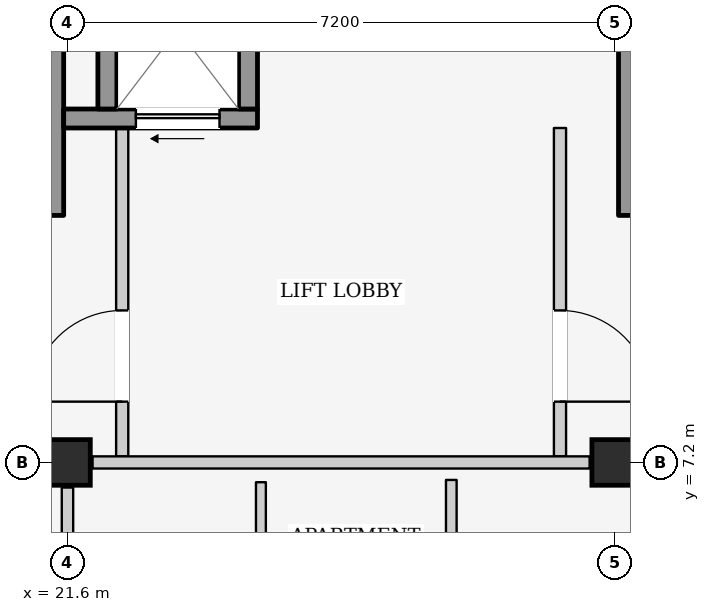
"""IFC4 building model, lengths in metres.
Left out: names, types, materials, properties, quantities, classifications, styles, units other than length and angle.
Written with IfcOpenShell. Run it as: python <this file> out.ifc"""

import sys

from ifc_helpers import new_model, si_unit, direction, frame, frame_2d, origin, origin_2d, place, context, subcontext, project, spatial, rectangle, extrude, element, fill, save


model = new_model("IFC4")
c1 = context("Model", 3, precision=1e-05, world=origin(), true_north=direction((0.0, 1.0)))
c2 = subcontext(c1, "Body", "Model", "MODEL_VIEW")
j1 = project(units=[si_unit("LENGTHUNIT", "METRE"), si_unit("PLANEANGLEUNIT", "RADIAN")], contexts=[c1])
p1 = place(None, origin())
s1 = spatial("IfcSite", under=j1, at=p1, CompositionType="ELEMENT")
p2 = place(p1, origin())
s2 = spatial("IfcBuilding", under=s1, at=p2, CompositionType="ELEMENT")
p3 = place(p2, frame((0.0, 0.0, 12.2)))
s3 = spatial("IfcBuildingStorey", under=s2, at=p3, CompositionType="ELEMENT", Elevation=12.2)
for number, where, z_axis, x_axis in (
    (1, (21.6, 7.2, 0.0), (0.0, 0.0, 1.0), (1.0, 0.0, 0.0)),
    (2, (28.8, 7.2, 0.0), (0.0, 0.0, 1.0), (1.0, 0.0, 0.0)),
):
    element("IfcColumn", number, at=place(p3, frame(where, z_axis=z_axis, x_axis=x_axis)), inside=s3, PredefinedType="COLUMN", context=c2, shape_type="SweptSolid", body=[
        extrude(rectangle(XDim=0.6, YDim=0.6, at=origin_2d()), origin(), (0.0, 0.0, 1.0), 3.2),
    ])
p4 = place(p3, frame((21.4, 10.45, 0.0), z_axis=(0.0, 0.0, 1.0), x_axis=(0.0, 1.0, 0.0)))
e3 = element("IfcWall", 3, at=p4, inside=s3, PredefinedType="SHEAR", context=c2, shape_type="SweptSolid", body=[
    extrude(rectangle(XDim=3.75, YDim=0.3, at=frame_2d((1.875, 0.0))), origin(), (0.0, 0.0, 1.0), 2.98),
])
p5 = place(p3, frame((22.32, 7.28, 0.0), z_axis=(0.0, 0.0, 1.0), x_axis=(0.0, 1.0, 0.0)))
e4 = element("IfcWall", 4, at=p5, inside=s3, PredefinedType="PARTITIONING", context=c2, shape_type="SweptSolid", body=[
    extrude(rectangle(XDim=4.32, YDim=0.16, at=frame_2d((2.16, 0.0))), origin(), (0.0, 0.0, 1.0), 2.98),
])
p6 = place(p5, frame((0.72, 0.0, 0.0)))
e5 = element("IfcOpeningElement", 5, at=p6, cuts=e4, PredefinedType="OPENING", context=c2, shape_type="SweptSolid", body=[
    extrude(rectangle(XDim=1.2, YDim=2.2, at=frame_2d((0.6, 1.1))), frame((0.0, 0.095, 0.0), z_axis=(0.0, -1.0, 0.0), x_axis=(1.0, 0.0, 0.0)), (0.0, 0.0, 1.0), 0.19),
])
p7 = place(p3, frame((28.08, 7.28, 0.0), z_axis=(0.0, 0.0, 1.0), x_axis=(0.0, 1.0, 0.0)))
e6 = element("IfcWall", 6, at=p7, inside=s3, PredefinedType="PARTITIONING", context=c2, shape_type="SweptSolid", body=[
    extrude(rectangle(XDim=4.32, YDim=0.16, at=frame_2d((2.16, 0.0))), origin(), (0.0, 0.0, 1.0), 2.98),
])
p8 = place(p7, frame((0.72, 0.0, 0.0)))
e7 = element("IfcOpeningElement", 7, at=p8, cuts=e6, PredefinedType="OPENING", context=c2, shape_type="SweptSolid", body=[
    extrude(rectangle(XDim=1.2, YDim=2.2, at=frame_2d((0.6, 1.1))), frame((0.0, 0.095, 0.0), z_axis=(0.0, -1.0, 0.0), x_axis=(1.0, 0.0, 0.0)), (0.0, 0.0, 1.0), 0.19),
])
p9 = place(p3, frame((21.55, 11.725, 0.0), z_axis=(0.0, 0.0, 1.0), x_axis=(1.0, 0.0, 0.0)))
e8 = element("IfcWall", 8, at=p9, inside=s3, PredefinedType="SHEAR", context=c2, shape_type="SweptSolid", body=[
    extrude(rectangle(XDim=2.55, YDim=0.25, at=frame_2d((1.275, 0.0))), origin(), (0.0, 0.0, 1.0), 2.98),
])
p10 = place(p9, frame((0.95, 0.0, 0.0)))
e9 = element("IfcOpeningElement", 9, at=p10, cuts=e8, PredefinedType="OPENING", context=c2, shape_type="SweptSolid", body=[
    extrude(rectangle(XDim=1.1, YDim=2.15, at=frame_2d((0.55, 1.075))), frame((0.0, 0.14, 0.0), z_axis=(0.0, -1.0, 0.0), x_axis=(1.0, 0.0, 0.0)), (0.0, 0.0, 1.0), 0.28),
])
for number, where, z_axis, x_axis in (
    (10, (22.125, 11.85, 0.0), (0.0, 0.0, 1.0), (0.0, 1.0, 0.0)),
    (11, (23.975, 11.85, 0.0), (0.0, 0.0, 1.0), (0.0, 1.0, 0.0)),
):
    element("IfcWall", number, at=place(p3, frame(where, z_axis=z_axis, x_axis=x_axis)), inside=s3, PredefinedType="SHEAR", context=c2, shape_type="SweptSolid", body=[
        extrude(rectangle(XDim=2.1, YDim=0.25, at=frame_2d((1.05, 0.0))), origin(), (0.0, 0.0, 1.0), 2.98),
    ])
p11 = place(p3, frame((29.0, 10.45, 0.0), z_axis=(0.0, 0.0, 1.0), x_axis=(0.0, 1.0, 0.0)))
e12 = element("IfcWall", 12, at=p11, inside=s3, PredefinedType="SHEAR", context=c2, shape_type="SweptSolid", body=[
    extrude(rectangle(XDim=3.6, YDim=0.3, at=frame_2d((1.8, 0.0))), origin(), (0.0, 0.0, 1.0), 2.98),
])
p12 = place(p3, frame((21.6, 0.33, 0.0), z_axis=(0.0, 0.0, 1.0), x_axis=(0.0, 1.0, 0.0)))
e13 = element("IfcWall", 13, at=p12, inside=s3, PredefinedType="PARTITIONING", context=c2, shape_type="SweptSolid", body=[
    extrude(rectangle(XDim=6.54, YDim=0.15, at=frame_2d((3.27, 0.0))), origin(), (0.0, 0.0, 1.0), 2.415),
])
p13 = place(p3, frame((21.93, 7.2, 0.0), z_axis=(0.0, 0.0, 1.0), x_axis=(1.0, 0.0, 0.0)))
e14 = element("IfcWall", 14, at=p13, inside=s3, PredefinedType="PARTITIONING", context=c2, shape_type="SweptSolid", body=[
    extrude(rectangle(XDim=6.54, YDim=0.16, at=frame_2d((3.27, 0.0))), origin(), (0.0, 0.0, 1.0), 2.365),
])
p14 = place(p3, frame((24.145, 3.9, 0.0), z_axis=(0.0, 0.0, 1.0), x_axis=(0.0, 1.0, 0.0)))
e15 = element("IfcWall", 15, at=p14, inside=s3, PredefinedType="PARTITIONING", context=c2, shape_type="SweptSolid", body=[
    extrude(rectangle(XDim=3.04, YDim=0.13, at=frame_2d((1.52, 0.0))), origin(), (0.0, 0.0, 1.0), 2.98),
])
p15 = place(p3, frame((26.65, 3.91, 0.0), z_axis=(0.0, 0.0, 1.0), x_axis=(0.0, 1.0, 0.0)))
e16 = element("IfcWall", 16, at=p15, inside=s3, PredefinedType="PARTITIONING", context=c2, shape_type="SweptSolid", body=[
    extrude(rectangle(XDim=3.06, YDim=0.14, at=frame_2d((1.53, 0.0))), origin(), (0.0, 0.0, 1.0), 2.98),
])
p16 = place(p6, origin())
e17 = element("IfcDoor", 17, at=p16, inside=s3, OperationType="SINGLE_SWING_LEFT", PredefinedType="DOOR", context=c2, shape_type="SweptSolid", body=[
    extrude(rectangle(XDim=1.2, YDim=2.2, at=frame_2d((0.6, 1.1))), frame((0.0, 0.025, 0.0), z_axis=(0.0, -1.0, 0.0), x_axis=(1.0, 0.0, 0.0)), (0.0, 0.0, 1.0), 0.05),
])
fill(e5, e17)
p17 = place(p8, frame((1.2, 0.0, 0.0), z_axis=(0.0, 0.0, 1.0), x_axis=(-1.0, 0.0, 0.0)))
e18 = element("IfcDoor", 18, at=p17, inside=s3, OperationType="SINGLE_SWING_RIGHT", PredefinedType="DOOR", context=c2, shape_type="SweptSolid", body=[
    extrude(rectangle(XDim=1.2, YDim=2.2, at=frame_2d((0.6, 1.1))), frame((0.0, 0.025, 0.0), z_axis=(0.0, -1.0, 0.0), x_axis=(1.0, 0.0, 0.0)), (0.0, 0.0, 1.0), 0.05),
])
fill(e7, e18)
p18 = place(p10, frame((1.1, 0.0, 0.0), z_axis=(0.0, 0.0, 1.0), x_axis=(-1.0, 0.0, 0.0)))
e19 = element("IfcDoor", 19, at=p18, inside=s3, OperationType="SLIDING_TO_LEFT", PredefinedType="DOOR", context=c2, shape_type="SweptSolid", body=[
    extrude(rectangle(XDim=1.1, YDim=2.15, at=frame_2d((0.55, 1.075))), frame((0.0, 0.025, 0.0), z_axis=(0.0, -1.0, 0.0), x_axis=(1.0, 0.0, 0.0)), (0.0, 0.0, 1.0), 0.05),
])
fill(e9, e19)
save(model, sys.argv[1])
